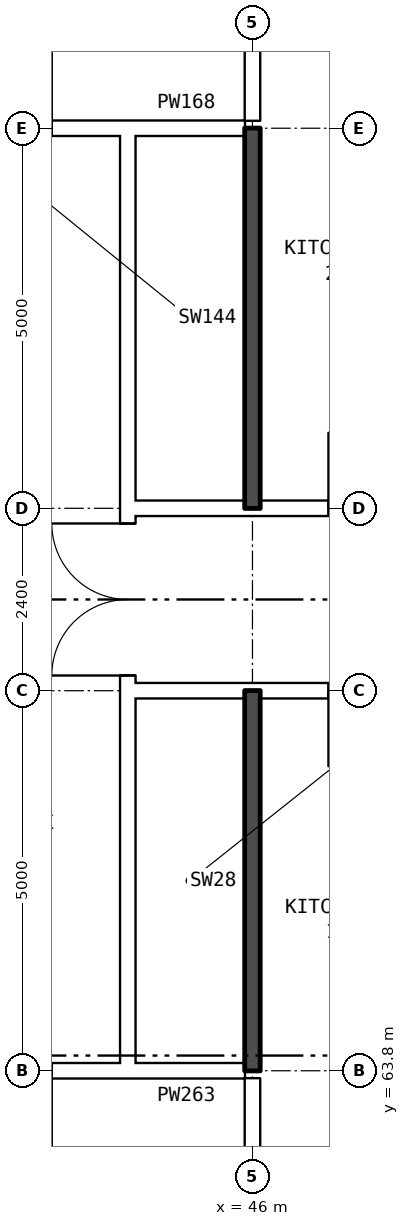
"""IFC4 building model, lengths in metres.
Left out: names, types, materials, properties, quantities, classifications, styles, units other than length and angle.
Written with IfcOpenShell. Run it as: python <this file> out.ifc"""

import sys

from ifc_helpers import new_model, si_unit, direction, frame, frame_2d, origin, place, context, subcontext, project, spatial, rectangle, extrude, element, fill, save


model = new_model("IFC4")
c1 = context("Model", 3, precision=1e-05, world=origin(), true_north=direction((0.0, 1.0)))
c2 = subcontext(c1, "Body", "Model", "MODEL_VIEW")
j1 = project(units=[si_unit("LENGTHUNIT", "METRE"), si_unit("PLANEANGLEUNIT", "RADIAN")], contexts=[c1])
p1 = place(None, origin())
s1 = spatial("IfcSite", under=j1, at=p1, CompositionType="ELEMENT")
p2 = place(p1, origin())
s2 = spatial("IfcBuilding", under=s1, at=p2, CompositionType="ELEMENT")
p3 = place(p2, frame((0.0, 0.0, 139.2)))
s3 = spatial("IfcBuildingStorey", under=s2, at=p3, CompositionType="ELEMENT", Elevation=139.2)
p4 = place(p3, frame((44.36, 63.9, 0.0), z_axis=(0.0, 0.0, 1.0), x_axis=(0.0, 1.0, 0.0)))
e1 = element("IfcWall", 1, at=p4, inside=s3, PredefinedType="PARTITIONING", context=c2, shape_type="SweptSolid", body=[
    extrude(rectangle(XDim=12.2, YDim=0.2, at=frame_2d((6.1, 0.0))), origin(), (0.0, 0.0, 1.0), 2.85),
])
p5 = place(p4, frame((5.1, 0.0, 0.0)))
e2 = element("IfcOpeningElement", 2, at=p5, cuts=e1, PredefinedType="OPENING", context=c2, shape_type="SweptSolid", body=[
    extrude(rectangle(XDim=2.0, YDim=2.1, at=frame_2d((1.0, 1.05))), frame((0.0, 0.11, 0.0), z_axis=(0.0, -1.0, 0.0), x_axis=(1.0, 0.0, 0.0)), (0.0, 0.0, 1.0), 0.22),
])
p6 = place(p3, frame((41.36, 63.8, 0.0), z_axis=(0.0, 0.0, 1.0), x_axis=(1.0, 0.0, 0.0)))
e3 = element("IfcWall", 3, at=p6, inside=s3, PredefinedType="PARTITIONING", context=c2, shape_type="SweptSolid", body=[
    extrude(rectangle(XDim=3.0, YDim=0.2, at=frame_2d((1.5, 0.0))), origin(), (0.0, 0.0, 1.0), 2.85),
])
p7 = place(p6, frame((1.0, 0.0, 0.0)))
e4 = element("IfcOpeningElement", 4, at=p7, cuts=e3, PredefinedType="OPENING", context=c2, shape_type="SweptSolid", body=[
    extrude(rectangle(XDim=1.0, YDim=2.1, at=frame_2d((0.5, 1.05))), frame((0.0, 0.11, 0.0), z_axis=(0.0, -1.0, 0.0), x_axis=(1.0, 0.0, 0.0)), (0.0, 0.0, 1.0), 0.22),
])
p8 = place(p3, frame((44.36, 63.8, 0.0), z_axis=(0.0, 0.0, 1.0), x_axis=(1.0, 0.0, 0.0)))
e5 = element("IfcWall", 5, at=p8, inside=s3, PredefinedType="PARTITIONING", context=c2, shape_type="SweptSolid", body=[
    extrude(rectangle(XDim=1.54, YDim=0.2, at=frame_2d((0.77, 0.0))), origin(), (0.0, 0.0, 1.0), 2.85),
])
p9 = place(p3, frame((44.36, 68.8, 0.0), z_axis=(0.0, 0.0, 1.0), x_axis=(1.0, 0.0, 0.0)))
e6 = element("IfcWall", 6, at=p9, inside=s3, PredefinedType="PARTITIONING", context=c2, shape_type="SweptSolid", body=[
    extrude(rectangle(XDim=19.28, YDim=0.2, at=frame_2d((9.64, 0.0))), origin(), (0.0, 0.0, 1.0), 2.85),
])
p10 = place(p9, frame((14.64, 0.0, 0.0)))
e7 = element("IfcOpeningElement", 7, at=p10, cuts=e6, PredefinedType="OPENING", context=c2, shape_type="SweptSolid", body=[
    extrude(rectangle(XDim=1.0, YDim=2.1, at=frame_2d((0.5, 1.05))), frame((0.0, 0.11, 0.0), z_axis=(0.0, -1.0, 0.0), x_axis=(1.0, 0.0, 0.0)), (0.0, 0.0, 1.0), 0.22),
])
p11 = place(p9, frame((8.64, 0.0, 0.0)))
e8 = element("IfcOpeningElement", 8, at=p11, cuts=e6, PredefinedType="OPENING", context=c2, shape_type="SweptSolid", body=[
    extrude(rectangle(XDim=1.0, YDim=2.1, at=frame_2d((0.5, 1.05))), frame((0.0, 0.11, 0.0), z_axis=(0.0, -1.0, 0.0), x_axis=(1.0, 0.0, 0.0)), (0.0, 0.0, 1.0), 0.22),
])
p12 = place(p9, frame((2.64, 0.0, 0.0)))
e9 = element("IfcOpeningElement", 9, at=p12, cuts=e6, PredefinedType="OPENING", context=c2, shape_type="SweptSolid", body=[
    extrude(rectangle(XDim=1.0, YDim=2.1, at=frame_2d((0.5, 1.05))), frame((0.0, 0.11, 0.0), z_axis=(0.0, -1.0, 0.0), x_axis=(1.0, 0.0, 0.0)), (0.0, 0.0, 1.0), 0.22),
])
p13 = place(p3, frame((44.36, 71.2, 0.0), z_axis=(0.0, 0.0, 1.0), x_axis=(1.0, 0.0, 0.0)))
e10 = element("IfcWall", 10, at=p13, inside=s3, PredefinedType="PARTITIONING", context=c2, shape_type="SweptSolid", body=[
    extrude(rectangle(XDim=19.28, YDim=0.2, at=frame_2d((9.64, 0.0))), origin(), (0.0, 0.0, 1.0), 2.85),
])
p14 = place(p13, frame((17.46, 0.0, 0.0)))
e11 = element("IfcOpeningElement", 11, at=p14, cuts=e10, PredefinedType="OPENING", context=c2, shape_type="SweptSolid", body=[
    extrude(rectangle(XDim=1.0, YDim=2.1, at=frame_2d((0.5, 1.05))), frame((0.0, 0.11, 0.0), z_axis=(0.0, -1.0, 0.0), x_axis=(1.0, 0.0, 0.0)), (0.0, 0.0, 1.0), 0.22),
])
p15 = place(p13, frame((8.64, 0.0, 0.0)))
e12 = element("IfcOpeningElement", 12, at=p15, cuts=e10, PredefinedType="OPENING", context=c2, shape_type="SweptSolid", body=[
    extrude(rectangle(XDim=1.0, YDim=2.1, at=frame_2d((0.5, 1.05))), frame((0.0, 0.11, 0.0), z_axis=(0.0, -1.0, 0.0), x_axis=(1.0, 0.0, 0.0)), (0.0, 0.0, 1.0), 0.22),
])
p16 = place(p13, frame((2.64, 0.0, 0.0)))
e13 = element("IfcOpeningElement", 13, at=p16, cuts=e10, PredefinedType="OPENING", context=c2, shape_type="SweptSolid", body=[
    extrude(rectangle(XDim=1.0, YDim=2.1, at=frame_2d((0.5, 1.05))), frame((0.0, 0.11, 0.0), z_axis=(0.0, -1.0, 0.0), x_axis=(1.0, 0.0, 0.0)), (0.0, 0.0, 1.0), 0.22),
])
p17 = place(p3, frame((41.36, 76.2, 0.0), z_axis=(0.0, 0.0, 1.0), x_axis=(1.0, 0.0, 0.0)))
e14 = element("IfcWall", 14, at=p17, inside=s3, PredefinedType="PARTITIONING", context=c2, shape_type="SweptSolid", body=[
    extrude(rectangle(XDim=3.0, YDim=0.2, at=frame_2d((1.5, 0.0))), origin(), (0.0, 0.0, 1.0), 2.85),
])
p18 = place(p17, frame((1.0, 0.0, 0.0)))
e15 = element("IfcOpeningElement", 15, at=p18, cuts=e14, PredefinedType="OPENING", context=c2, shape_type="SweptSolid", body=[
    extrude(rectangle(XDim=1.0, YDim=2.1, at=frame_2d((0.5, 1.05))), frame((0.0, 0.11, 0.0), z_axis=(0.0, -1.0, 0.0), x_axis=(1.0, 0.0, 0.0)), (0.0, 0.0, 1.0), 0.22),
])
p19 = place(p3, frame((44.36, 76.2, 0.0), z_axis=(0.0, 0.0, 1.0), x_axis=(1.0, 0.0, 0.0)))
e16 = element("IfcWall", 16, at=p19, inside=s3, PredefinedType="PARTITIONING", context=c2, shape_type="SweptSolid", body=[
    extrude(rectangle(XDim=1.54, YDim=0.2, at=frame_2d((0.77, 0.0))), origin(), (0.0, 0.0, 1.0), 2.85),
])
p20 = place(p3, frame((46.0, 61.5, 0.0), z_axis=(0.0, 0.0, 1.0), x_axis=(0.0, 1.0, 0.0)))
e17 = element("IfcWall", 17, at=p20, inside=s3, PredefinedType="PARTITIONING", context=c2, shape_type="SweptSolid", body=[
    extrude(rectangle(XDim=2.2, YDim=0.2, at=frame_2d((1.1, 0.0))), origin(), (0.0, 0.0, 1.0), 2.85),
])
for number, where, z_axis, x_axis in (
    (18, (46.0, 63.8, 0.0), (0.0, 0.0, 1.0), (0.0, 1.0, 0.0)),
    (19, (46.0, 71.2, 0.0), (0.0, 0.0, 1.0), (0.0, 1.0, 0.0)),
):
    element("IfcWall", number, at=place(p3, frame(where, z_axis=z_axis, x_axis=x_axis)), inside=s3, PredefinedType="SOLIDWALL", context=c2, shape_type="SweptSolid", body=[
        extrude(rectangle(XDim=5.0, YDim=0.2, at=frame_2d((2.5, 0.0))), origin(), (0.0, 0.0, 1.0), 2.85),
    ])
p21 = place(p3, frame((46.0, 76.3, 0.0), z_axis=(0.0, 0.0, 1.0), x_axis=(0.0, 1.0, 0.0)))
e20 = element("IfcWall", 20, at=p21, inside=s3, PredefinedType="PARTITIONING", context=c2, shape_type="SweptSolid", body=[
    extrude(rectangle(XDim=2.2, YDim=0.2, at=frame_2d((1.1, 0.0))), origin(), (0.0, 0.0, 1.0), 2.85),
])
p22 = place(p5, origin())
e21 = element("IfcDoor", 21, at=p22, inside=s3, OperationType="DOUBLE_DOOR_SINGLE_SWING", PredefinedType="DOOR", context=c2, shape_type="SweptSolid", body=[
    extrude(rectangle(XDim=2.0, YDim=2.1, at=frame_2d((1.0, 1.05))), frame((0.0, 0.025, 0.0), z_axis=(0.0, -1.0, 0.0), x_axis=(1.0, 0.0, 0.0)), (0.0, 0.0, 1.0), 0.05),
])
fill(e2, e21)
save(model, sys.argv[1])
